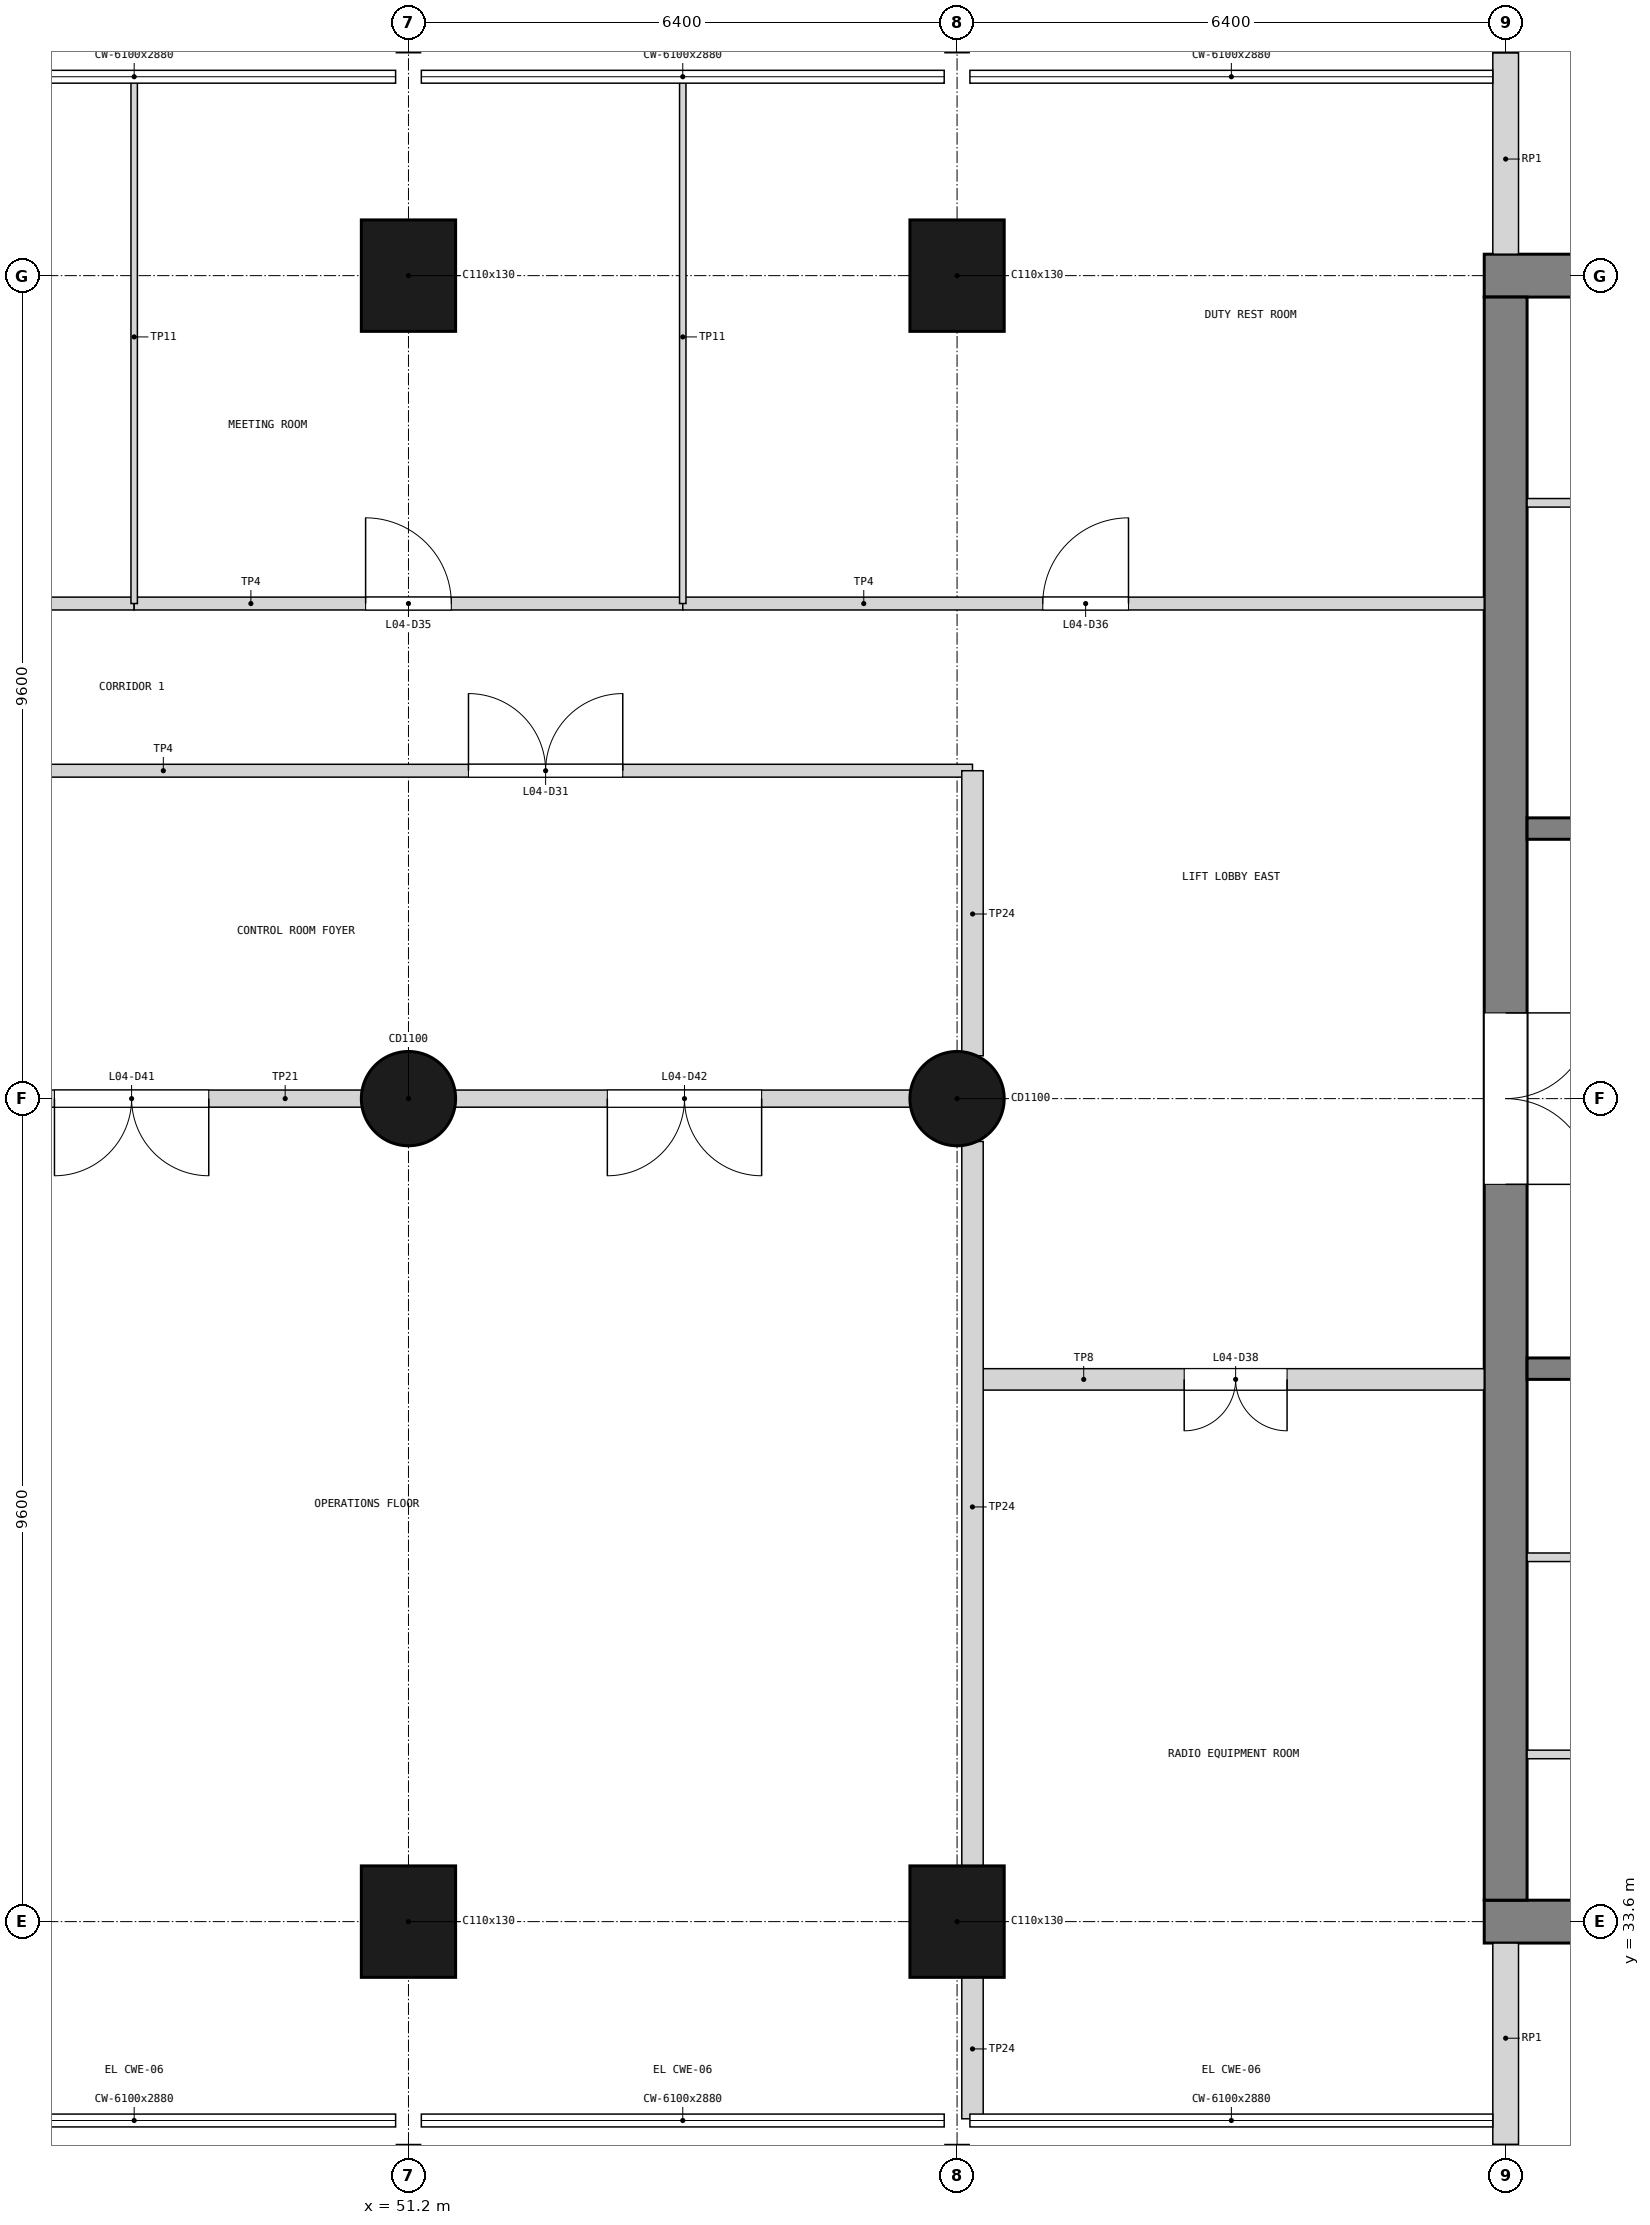
"""IFC4 building model, lengths in metres.
Left out: names, types, materials, properties, quantities, classifications, styles, units other than length and angle.
Written with IfcOpenShell. Run it as: python <this file> out.ifc"""

import sys

from ifc_helpers import new_model, si_unit, direction, frame, frame_2d, origin, origin_2d, place, context, subcontext, project, spatial, rectangle, circle, extrude, element, fill, save


model = new_model("IFC4")
c1 = context("Model", 3, precision=1e-05, world=origin(), true_north=direction((0.0, 1.0)))
c2 = subcontext(c1, "Body", "Model", "MODEL_VIEW")
j1 = project(units=[si_unit("LENGTHUNIT", "METRE"), si_unit("PLANEANGLEUNIT", "RADIAN")], contexts=[c1])
p1 = place(None, origin())
s1 = spatial("IfcSite", under=j1, at=p1, CompositionType="ELEMENT")
p2 = place(p1, origin())
s2 = spatial("IfcBuilding", under=s1, at=p2, CompositionType="ELEMENT")
p3 = place(p2, frame((0.0, 0.0, 17.1)))
s3 = spatial("IfcBuildingStorey", under=s2, at=p3, CompositionType="ELEMENT", Elevation=17.1)
p4 = place(p3, frame((63.75, 52.8, 0.0), z_axis=(0.0, 0.0, 1.0), x_axis=(1.0, 0.0, 0.0)))
e1 = element("IfcWall", 1, at=p4, inside=s3, PredefinedType="SHEAR", context=c2, shape_type="SweptSolid", body=[
    extrude(rectangle(XDim=13.3, YDim=0.5, at=frame_2d((6.65, 0.0))), origin(), (0.0, 0.0, 1.0), 3.9),
])
p5 = place(p4, frame((11.05, 0.0, 1.0)))
e2 = element("IfcOpeningElement", 2, at=p5, cuts=e1, PredefinedType="OPENING", context=c2, shape_type="SweptSolid", body=[
    extrude(rectangle(XDim=0.4, YDim=2.0, at=frame_2d((0.2, 1.0))), frame((0.0, 0.26, 0.0), z_axis=(0.0, -1.0, 0.0), x_axis=(1.0, 0.0, 0.0)), (0.0, 0.0, 1.0), 0.52),
])
p6 = place(p3, frame((63.75, 33.6, 0.0), z_axis=(0.0, 0.0, 1.0), x_axis=(1.0, 0.0, 0.0)))
e3 = element("IfcWall", 3, at=p6, inside=s3, PredefinedType="SHEAR", context=c2, shape_type="SweptSolid", body=[
    extrude(rectangle(XDim=13.3, YDim=0.5, at=frame_2d((6.65, 0.0))), origin(), (0.0, 0.0, 1.0), 3.9),
])
p7 = place(p6, frame((11.05, 0.0, 1.0)))
e4 = element("IfcOpeningElement", 4, at=p7, cuts=e3, PredefinedType="OPENING", context=c2, shape_type="SweptSolid", body=[
    extrude(rectangle(XDim=0.4, YDim=2.0, at=frame_2d((0.2, 1.0))), frame((0.0, 0.26, 0.0), z_axis=(0.0, -1.0, 0.0), x_axis=(1.0, 0.0, 0.0)), (0.0, 0.0, 1.0), 0.52),
])
p8 = place(p3, frame((64.0, 33.85, 0.0), z_axis=(0.0, 0.0, 1.0), x_axis=(0.0, 1.0, 0.0)))
e5 = element("IfcWall", 5, at=p8, inside=s3, PredefinedType="SHEAR", context=c2, shape_type="SweptSolid", body=[
    extrude(rectangle(XDim=18.7, YDim=0.5, at=frame_2d((9.35, 0.0))), origin(), (0.0, 0.0, 1.0), 3.9),
])
p9 = place(p8, frame((8.35, 0.0, 0.0)))
e6 = element("IfcOpeningElement", 6, at=p9, cuts=e5, PredefinedType="OPENING", context=c2, shape_type="SweptSolid", body=[
    extrude(rectangle(XDim=2.0, YDim=2.1, at=frame_2d((1.0, 1.05))), frame((0.0, 0.26, 0.0), z_axis=(0.0, -1.0, 0.0), x_axis=(1.0, 0.0, 0.0)), (0.0, 0.0, 1.0), 0.52),
])
p10 = place(p3, frame((51.2, 33.6, 0.0), z_axis=(0.0, 0.0, 1.0), x_axis=(1.0, 0.0, 0.0)))
e7 = element("IfcColumn", 7, at=p10, inside=s3, PredefinedType="COLUMN", context=c2, shape_type="SweptSolid", body=[
    extrude(rectangle(XDim=1.1, YDim=1.3, at=origin_2d()), origin(), (0.0, 0.0, 1.0), 3.9),
])
p11 = place(p3, frame((51.2, 43.2, 0.0), z_axis=(0.0, 0.0, 1.0), x_axis=(1.0, 0.0, 0.0)))
e8 = element("IfcColumn", 8, at=p11, inside=s3, PredefinedType="COLUMN", context=c2, shape_type="SweptSolid", body=[
    extrude(circle(Radius=0.55, at=origin_2d()), origin(), (0.0, 0.0, 1.0), 3.9),
])
for number, where, z_axis, x_axis in (
    (9, (51.2, 52.8, 0.0), (0.0, 0.0, 1.0), (1.0, 0.0, 0.0)),
    (10, (57.6, 33.6, 0.0), (0.0, 0.0, 1.0), (1.0, 0.0, 0.0)),
):
    element("IfcColumn", number, at=place(p3, frame(where, z_axis=z_axis, x_axis=x_axis)), inside=s3, PredefinedType="COLUMN", context=c2, shape_type="SweptSolid", body=[
        extrude(rectangle(XDim=1.1, YDim=1.3, at=origin_2d()), origin(), (0.0, 0.0, 1.0), 3.9),
    ])
p12 = place(p3, frame((57.6, 43.2, 0.0), z_axis=(0.0, 0.0, 1.0), x_axis=(1.0, 0.0, 0.0)))
e11 = element("IfcColumn", 11, at=p12, inside=s3, PredefinedType="COLUMN", context=c2, shape_type="SweptSolid", body=[
    extrude(circle(Radius=0.55, at=origin_2d()), origin(), (0.0, 0.0, 1.0), 3.9),
])
p13 = place(p3, frame((57.6, 52.8, 0.0), z_axis=(0.0, 0.0, 1.0), x_axis=(1.0, 0.0, 0.0)))
e12 = element("IfcColumn", 12, at=p13, inside=s3, PredefinedType="COLUMN", context=c2, shape_type="SweptSolid", body=[
    extrude(rectangle(XDim=1.1, YDim=1.3, at=origin_2d()), origin(), (0.0, 0.0, 1.0), 3.9),
])
p14 = place(p3, frame((64.0, 31.0, 0.0), z_axis=(0.0, 0.0, 1.0), x_axis=(0.0, 1.0, 0.0)))
e13 = element("IfcWall", 13, at=p14, inside=s3, PredefinedType="SOLIDWALL", context=c2, shape_type="SweptSolid", body=[
    extrude(rectangle(XDim=2.35, YDim=0.3, at=frame_2d((1.175, 0.0))), origin(), (0.0, 0.0, 1.0), 2.88),
])
p15 = place(p3, frame((64.0, 53.05, 0.0), z_axis=(0.0, 0.0, 1.0), x_axis=(0.0, 1.0, 0.0)))
e14 = element("IfcWall", 14, at=p15, inside=s3, PredefinedType="SOLIDWALL", context=c2, shape_type="SweptSolid", body=[
    extrude(rectangle(XDim=2.35, YDim=0.3, at=frame_2d((1.175, 0.0))), origin(), (0.0, 0.0, 1.0), 2.88),
])
for number, where, z_axis, x_axis in (
    (15, (69.725, 40.05, 0.0), (0.0, 0.0, 1.0), (-1.0, 0.0, 0.0)),
    (16, (69.725, 46.35, 0.0), (0.0, 0.0, 1.0), (-1.0, 0.0, 0.0)),
):
    element("IfcWall", number, at=place(p3, frame(where, z_axis=z_axis, x_axis=x_axis)), inside=s3, PredefinedType="SOLIDWALL", context=c2, shape_type="SweptSolid", body=[
        extrude(rectangle(XDim=5.475, YDim=0.25, at=frame_2d((2.738, 0.0))), origin(), (0.0, 0.0, 1.0), 3.6),
    ])
p16 = place(p3, frame((69.475, 35.55, 0.0), z_axis=(0.0, 0.0, 1.0), x_axis=(-1.0, 0.0, 0.0)))
e17 = element("IfcWall", 17, at=p16, inside=s3, PredefinedType="PARTITIONING", context=c2, shape_type="SweptSolid", body=[
    extrude(rectangle(XDim=5.225, YDim=0.1, at=frame_2d((2.613, 0.0))), origin(), (0.0, 0.0, 1.0), 3.6),
])
p17 = place(p3, frame((67.925, 37.85, 0.0), z_axis=(0.0, 0.0, 1.0), x_axis=(-1.0, 0.0, 0.0)))
e18 = element("IfcWall", 18, at=p17, inside=s3, PredefinedType="PARTITIONING", context=c2, shape_type="SweptSolid", body=[
    extrude(rectangle(XDim=3.675, YDim=0.1, at=frame_2d((1.837, 0.0))), origin(), (0.0, 0.0, 1.0), 3.6),
])
p18 = place(p3, frame((69.475, 50.15, 0.0), z_axis=(0.0, 0.0, 1.0), x_axis=(-1.0, 0.0, 0.0)))
e19 = element("IfcWall", 19, at=p18, inside=s3, PredefinedType="PARTITIONING", context=c2, shape_type="SweptSolid", body=[
    extrude(rectangle(XDim=5.225, YDim=0.1, at=frame_2d((2.613, 0.0))), origin(), (0.0, 0.0, 1.0), 3.6),
])
p19 = place(p3, frame((38.22, 47.025, 0.0), z_axis=(0.0, 0.0, 1.0), x_axis=(1.0, 0.0, 0.0)))
e20 = element("IfcWall", 20, at=p19, inside=s3, PredefinedType="PARTITIONING", context=c2, shape_type="SweptSolid", body=[
    extrude(rectangle(XDim=19.56, YDim=0.15, at=frame_2d((9.78, 0.0))), origin(), (0.0, 0.0, 1.0), 3.68),
])
p20 = place(p19, frame((4.03, 0.0, 0.0)))
e21 = element("IfcOpeningElement", 21, at=p20, cuts=e20, PredefinedType="OPENING", context=c2, shape_type="SweptSolid", body=[
    extrude(rectangle(XDim=1.8, YDim=2.1, at=frame_2d((0.9, 1.05))), frame((0.0, 0.085, 0.0), z_axis=(0.0, -1.0, 0.0), x_axis=(1.0, 0.0, 0.0)), (0.0, 0.0, 1.0), 0.17),
])
p21 = place(p19, frame((13.68, 0.0, 0.0)))
e22 = element("IfcOpeningElement", 22, at=p21, cuts=e20, PredefinedType="OPENING", context=c2, shape_type="SweptSolid", body=[
    extrude(rectangle(XDim=1.8, YDim=2.1, at=frame_2d((0.9, 1.05))), frame((0.0, 0.085, 0.0), z_axis=(0.0, -1.0, 0.0), x_axis=(1.0, 0.0, 0.0)), (0.0, 0.0, 1.0), 0.17),
])
p22 = place(p3, frame((38.22, 48.975, 0.0), z_axis=(0.0, 0.0, 1.0), x_axis=(1.0, 0.0, 0.0)))
e23 = element("IfcWall", 23, at=p22, inside=s3, PredefinedType="PARTITIONING", context=c2, shape_type="SweptSolid", body=[
    extrude(rectangle(XDim=9.78, YDim=0.15, at=frame_2d((4.89, 0.0))), origin(), (0.0, 0.0, 1.0), 3.68),
])
p23 = place(p22, frame((4.03, 0.0, 0.0)))
e24 = element("IfcOpeningElement", 24, at=p23, cuts=e23, PredefinedType="OPENING", context=c2, shape_type="SweptSolid", body=[
    extrude(rectangle(XDim=1.8, YDim=2.1, at=frame_2d((0.9, 1.05))), frame((0.0, 0.085, 0.0), z_axis=(0.0, -1.0, 0.0), x_axis=(1.0, 0.0, 0.0)), (0.0, 0.0, 1.0), 0.17),
])
p24 = place(p3, frame((48.0, 48.975, 0.0), z_axis=(0.0, 0.0, 1.0), x_axis=(1.0, 0.0, 0.0)))
e25 = element("IfcWall", 25, at=p24, inside=s3, PredefinedType="PARTITIONING", context=c2, shape_type="SweptSolid", body=[
    extrude(rectangle(XDim=6.4, YDim=0.15, at=frame_2d((3.2, 0.0))), origin(), (0.0, 0.0, 1.0), 3.68),
])
p25 = place(p24, frame((2.7, 0.0, 0.0)))
e26 = element("IfcOpeningElement", 26, at=p25, cuts=e25, PredefinedType="OPENING", context=c2, shape_type="SweptSolid", body=[
    extrude(rectangle(XDim=1.0, YDim=2.1, at=frame_2d((0.5, 1.05))), frame((0.0, 0.085, 0.0), z_axis=(0.0, -1.0, 0.0), x_axis=(1.0, 0.0, 0.0)), (0.0, 0.0, 1.0), 0.17),
])
p26 = place(p3, frame((54.4, 48.975, 0.0), z_axis=(0.0, 0.0, 1.0), x_axis=(1.0, 0.0, 0.0)))
e27 = element("IfcWall", 27, at=p26, inside=s3, PredefinedType="PARTITIONING", context=c2, shape_type="SweptSolid", body=[
    extrude(rectangle(XDim=9.35, YDim=0.15, at=frame_2d((4.675, 0.0))), origin(), (0.0, 0.0, 1.0), 3.68),
])
p27 = place(p26, frame((4.2, 0.0, 0.0)))
e28 = element("IfcOpeningElement", 28, at=p27, cuts=e27, PredefinedType="OPENING", context=c2, shape_type="SweptSolid", body=[
    extrude(rectangle(XDim=1.0, YDim=2.1, at=frame_2d((0.5, 1.05))), frame((0.0, 0.085, 0.0), z_axis=(0.0, -1.0, 0.0), x_axis=(1.0, 0.0, 0.0)), (0.0, 0.0, 1.0), 0.17),
])
for number, where, z_axis, x_axis in (
    (29, (48.0, 48.975, 0.0), (0.0, 0.0, 1.0), (0.0, 1.0, 0.0)),
    (30, (54.4, 48.975, 0.0), (0.0, 0.0, 1.0), (0.0, 1.0, 0.0)),
):
    element("IfcWall", number, at=place(p3, frame(where, z_axis=z_axis, x_axis=x_axis)), inside=s3, PredefinedType="PARTITIONING", context=c2, shape_type="SweptSolid", body=[
        extrude(rectangle(XDim=6.125, YDim=0.075, at=frame_2d((3.062, 0.0))), origin(), (0.0, 0.0, 1.0), 3.08),
    ])
p28 = place(p3, frame((31.82, 43.2, 0.0), z_axis=(0.0, 0.0, 1.0), x_axis=(1.0, 0.0, 0.0)))
e31 = element("IfcWall", 31, at=p28, inside=s3, PredefinedType="PARTITIONING", context=c2, shape_type="SweptSolid", body=[
    extrude(rectangle(XDim=25.96, YDim=0.2, at=frame_2d((12.98, 0.0))), origin(), (0.0, 0.0, 1.0), 2.88),
])
p29 = place(p28, frame((7.475, 0.0, 0.0)))
e32 = element("IfcOpeningElement", 32, at=p29, cuts=e31, PredefinedType="OPENING", context=c2, shape_type="SweptSolid", body=[
    extrude(rectangle(XDim=1.8, YDim=2.1, at=frame_2d((0.9, 1.05))), frame((0.0, 0.11, 0.0), z_axis=(0.0, -1.0, 0.0), x_axis=(1.0, 0.0, 0.0)), (0.0, 0.0, 1.0), 0.22),
])
p30 = place(p28, frame((10.225, 0.0, 0.0)))
e33 = element("IfcOpeningElement", 33, at=p30, cuts=e31, PredefinedType="OPENING", context=c2, shape_type="SweptSolid", body=[
    extrude(rectangle(XDim=1.8, YDim=2.1, at=frame_2d((0.9, 1.05))), frame((0.0, 0.11, 0.0), z_axis=(0.0, -1.0, 0.0), x_axis=(1.0, 0.0, 0.0)), (0.0, 0.0, 1.0), 0.22),
])
p31 = place(p28, frame((15.25, 0.0, 0.0)))
e34 = element("IfcOpeningElement", 34, at=p31, cuts=e31, PredefinedType="OPENING", context=c2, shape_type="SweptSolid", body=[
    extrude(rectangle(XDim=1.8, YDim=2.1, at=frame_2d((0.9, 1.05))), frame((0.0, 0.11, 0.0), z_axis=(0.0, -1.0, 0.0), x_axis=(1.0, 0.0, 0.0)), (0.0, 0.0, 1.0), 0.22),
])
p32 = place(p28, frame((21.7, 0.0, 0.0)))
e35 = element("IfcOpeningElement", 35, at=p32, cuts=e31, PredefinedType="OPENING", context=c2, shape_type="SweptSolid", body=[
    extrude(rectangle(XDim=1.8, YDim=2.1, at=frame_2d((0.9, 1.05))), frame((0.0, 0.11, 0.0), z_axis=(0.0, -1.0, 0.0), x_axis=(1.0, 0.0, 0.0)), (0.0, 0.0, 1.0), 0.22),
])
p33 = place(p3, frame((57.78, 39.925, 0.0), z_axis=(0.0, 0.0, 1.0), x_axis=(1.0, 0.0, 0.0)))
e36 = element("IfcWall", 36, at=p33, inside=s3, PredefinedType="PARTITIONING", context=c2, shape_type="SweptSolid", body=[
    extrude(rectangle(XDim=5.97, YDim=0.25, at=frame_2d((2.985, 0.0))), origin(), (0.0, 0.0, 1.0), 3.68),
])
p34 = place(p33, frame((2.47, 0.0, 0.0)))
e37 = element("IfcOpeningElement", 37, at=p34, cuts=e36, PredefinedType="OPENING", context=c2, shape_type="SweptSolid", body=[
    extrude(rectangle(XDim=1.2, YDim=2.1, at=frame_2d((0.6, 1.05))), frame((0.0, 0.135, 0.0), z_axis=(0.0, -1.0, 0.0), x_axis=(1.0, 0.0, 0.0)), (0.0, 0.0, 1.0), 0.27),
])
p35 = place(p3, frame((57.78, 31.3, 0.0), z_axis=(0.0, 0.0, 1.0), x_axis=(0.0, 1.0, 0.0)))
e38 = element("IfcWall", 38, at=p35, inside=s3, PredefinedType="PARTITIONING", context=c2, shape_type="SweptSolid", body=[
    extrude(rectangle(XDim=1.67, YDim=0.25, at=frame_2d((0.835, 0.0))), origin(), (0.0, 0.0, 1.0), 2.78),
])
p36 = place(p3, frame((57.78, 34.23, 0.0), z_axis=(0.0, 0.0, 1.0), x_axis=(0.0, 1.0, 0.0)))
e39 = element("IfcWall", 39, at=p36, inside=s3, PredefinedType="PARTITIONING", context=c2, shape_type="SweptSolid", body=[
    extrude(rectangle(XDim=8.47, YDim=0.25, at=frame_2d((4.235, 0.0))), origin(), (0.0, 0.0, 1.0), 2.78),
])
p37 = place(p3, frame((57.78, 43.7, 0.0), z_axis=(0.0, 0.0, 1.0), x_axis=(0.0, 1.0, 0.0)))
e40 = element("IfcWall", 40, at=p37, inside=s3, PredefinedType="PARTITIONING", context=c2, shape_type="SweptSolid", body=[
    extrude(rectangle(XDim=3.325, YDim=0.25, at=frame_2d((1.663, 0.0))), origin(), (0.0, 0.0, 1.0), 2.78),
])
p38 = place(p9, frame((2.0, 0.0, 0.0), z_axis=(0.0, 0.0, 1.0), x_axis=(-1.0, 0.0, 0.0)))
e41 = element("IfcDoor", 41, at=p38, inside=s3, OperationType="DOUBLE_DOOR_SINGLE_SWING", PredefinedType="DOOR", context=c2, shape_type="SweptSolid", body=[
    extrude(rectangle(XDim=2.0, YDim=2.1, at=frame_2d((1.0, 1.05))), frame((0.0, 0.025, 0.0), z_axis=(0.0, -1.0, 0.0), x_axis=(1.0, 0.0, 0.0)), (0.0, 0.0, 1.0), 0.05),
])
fill(e6, e41)
p39 = place(p21, origin())
e42 = element("IfcDoor", 42, at=p39, inside=s3, OperationType="DOUBLE_DOOR_SINGLE_SWING", PredefinedType="DOOR", context=c2, shape_type="SweptSolid", body=[
    extrude(rectangle(XDim=1.8, YDim=2.1, at=frame_2d((0.9, 1.05))), frame((0.0, 0.025, 0.0), z_axis=(0.0, -1.0, 0.0), x_axis=(1.0, 0.0, 0.0)), (0.0, 0.0, 1.0), 0.05),
])
fill(e22, e42)
p40 = place(p25, origin())
e43 = element("IfcDoor", 43, at=p40, inside=s3, OperationType="SINGLE_SWING_LEFT", PredefinedType="DOOR", context=c2, shape_type="SweptSolid", body=[
    extrude(rectangle(XDim=1.0, YDim=2.1, at=frame_2d((0.5, 1.05))), frame((0.0, 0.025, 0.0), z_axis=(0.0, -1.0, 0.0), x_axis=(1.0, 0.0, 0.0)), (0.0, 0.0, 1.0), 0.05),
])
fill(e26, e43)
p41 = place(p27, origin())
e44 = element("IfcDoor", 44, at=p41, inside=s3, OperationType="SINGLE_SWING_RIGHT", PredefinedType="DOOR", context=c2, shape_type="SweptSolid", body=[
    extrude(rectangle(XDim=1.0, YDim=2.1, at=frame_2d((0.5, 1.05))), frame((0.0, 0.025, 0.0), z_axis=(0.0, -1.0, 0.0), x_axis=(1.0, 0.0, 0.0)), (0.0, 0.0, 1.0), 0.05),
])
fill(e28, e44)
p42 = place(p34, frame((1.2, 0.0, 0.0), z_axis=(0.0, 0.0, 1.0), x_axis=(-1.0, 0.0, 0.0)))
e45 = element("IfcDoor", 45, at=p42, inside=s3, OperationType="DOUBLE_DOOR_SINGLE_SWING", PredefinedType="DOOR", context=c2, shape_type="SweptSolid", body=[
    extrude(rectangle(XDim=1.2, YDim=2.1, at=frame_2d((0.6, 1.05))), frame((0.0, 0.025, 0.0), z_axis=(0.0, -1.0, 0.0), x_axis=(1.0, 0.0, 0.0)), (0.0, 0.0, 1.0), 0.05),
])
fill(e37, e45)
p43 = place(p31, frame((1.8, 0.0, 0.0), z_axis=(0.0, 0.0, 1.0), x_axis=(-1.0, 0.0, 0.0)))
e46 = element("IfcDoor", 46, at=p43, inside=s3, OperationType="DOUBLE_DOOR_SINGLE_SWING", PredefinedType="DOOR", context=c2, shape_type="SweptSolid", body=[
    extrude(rectangle(XDim=1.8, YDim=2.1, at=frame_2d((0.9, 1.05))), frame((0.0, 0.025, 0.0), z_axis=(0.0, -1.0, 0.0), x_axis=(1.0, 0.0, 0.0)), (0.0, 0.0, 1.0), 0.05),
])
fill(e34, e46)
p44 = place(p32, frame((1.8, 0.0, 0.0), z_axis=(0.0, 0.0, 1.0), x_axis=(-1.0, 0.0, 0.0)))
e47 = element("IfcDoor", 47, at=p44, inside=s3, OperationType="DOUBLE_DOOR_SINGLE_SWING", PredefinedType="DOOR", context=c2, shape_type="SweptSolid", body=[
    extrude(rectangle(XDim=1.8, YDim=2.1, at=frame_2d((0.9, 1.05))), frame((0.0, 0.025, 0.0), z_axis=(0.0, -1.0, 0.0), x_axis=(1.0, 0.0, 0.0)), (0.0, 0.0, 1.0), 0.05),
])
fill(e35, e47)
save(model, sys.argv[1])
